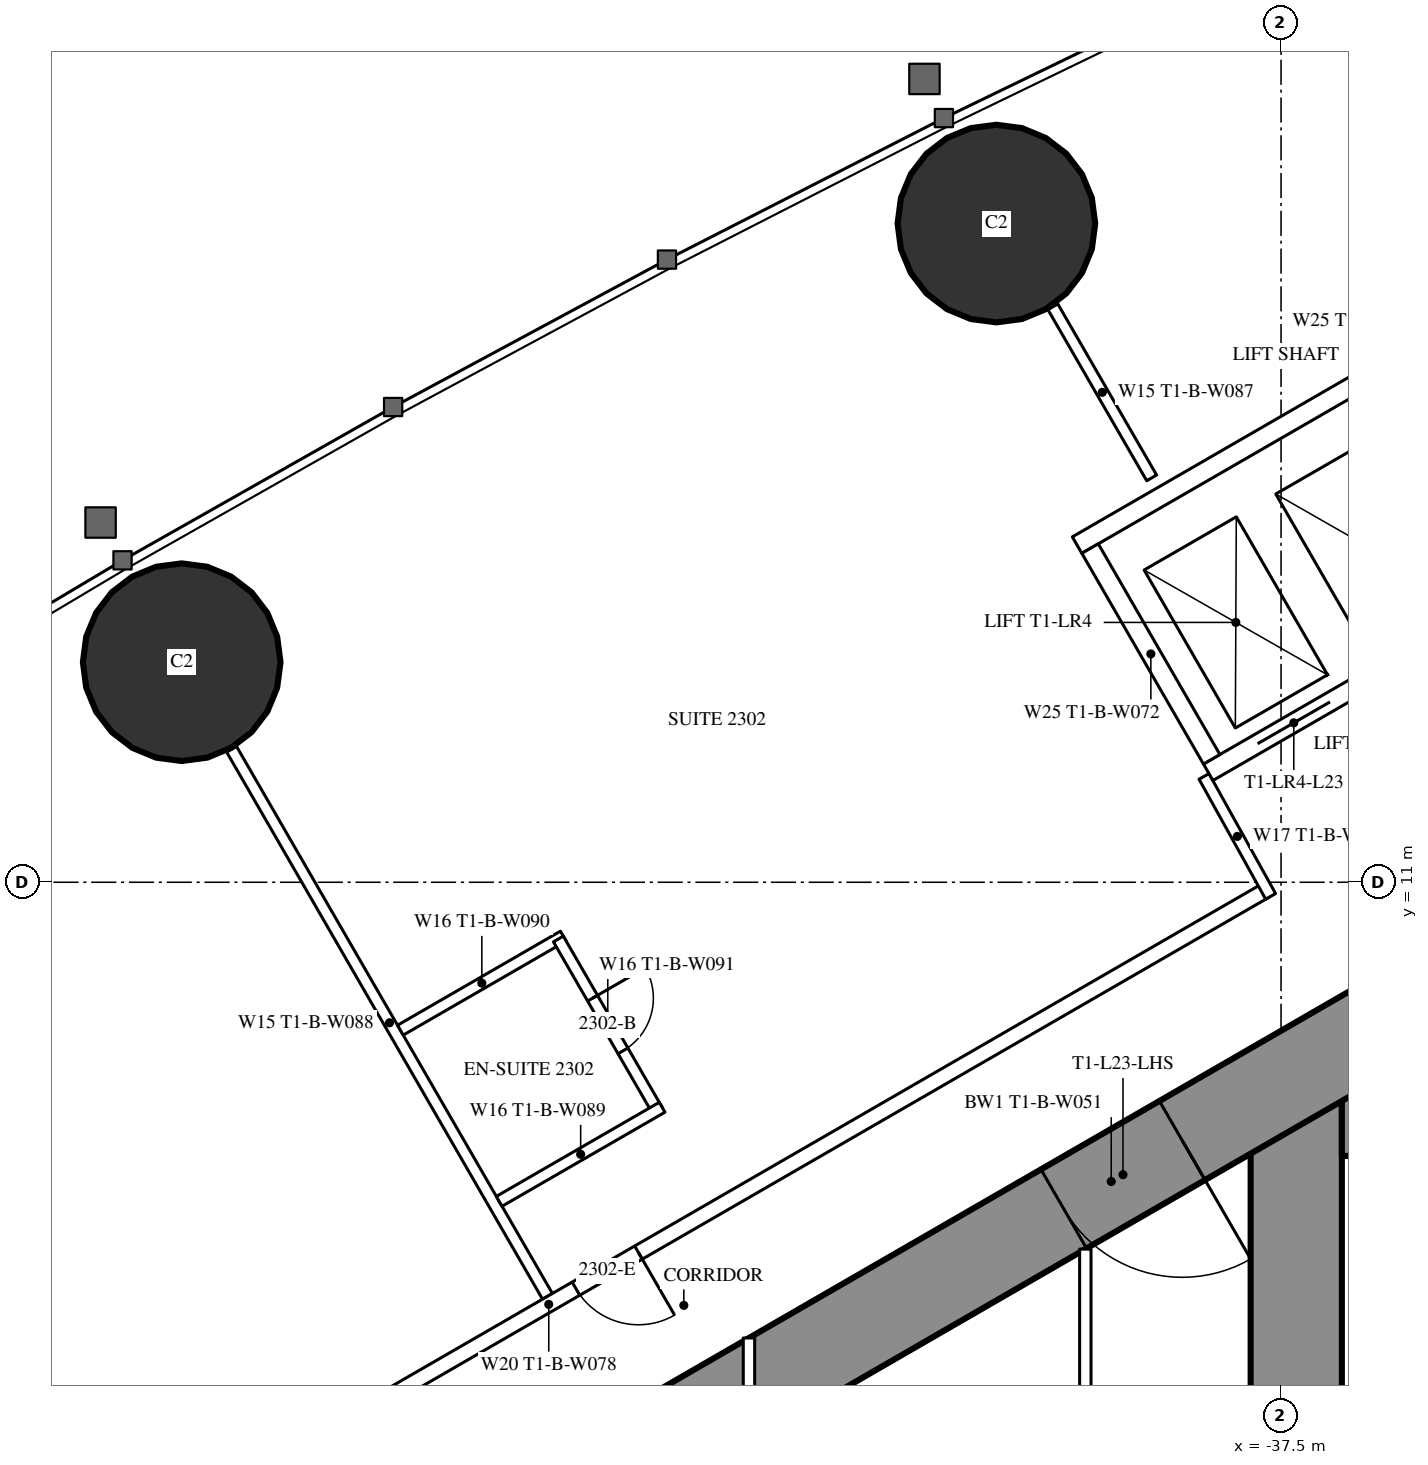
"""IFC4 building model, lengths in metres.
Left out: names, types, materials, properties, quantities, classifications, styles, units other than length and angle.
Written with IfcOpenShell. Run it as: python <this file> out.ifc"""

import sys

from ifc_helpers import new_model, si_unit, direction, frame, frame_2d, origin, origin_2d, place, context, subcontext, project, spatial, rectangle, hollow_circle, extrude, element, fill, save


model = new_model("IFC4")
c1 = context("Model", 3, precision=1e-05, world=origin(), true_north=direction((0.0, 1.0)))
c2 = subcontext(c1, "Body", "Model", "MODEL_VIEW")
j1 = project(units=[si_unit("LENGTHUNIT", "METRE"), si_unit("PLANEANGLEUNIT", "RADIAN")], contexts=[c1])
p1 = place(None, origin())
s1 = spatial("IfcSite", under=j1, at=p1, CompositionType="ELEMENT")
p2 = place(p1, origin())
s2 = spatial("IfcBuilding", under=s1, at=p2, CompositionType="ELEMENT")
p3 = place(p2, frame((0.0, 0.0, 90.6)))
s3 = spatial("IfcBuildingStorey", under=s2, at=p3, CompositionType="ELEMENT", Elevation=90.6)
for number, where, z_axis, x_axis in (
    (1, (-41.245, 19.666, 0.0), (0.0, 0.0, 1.0), (1.0, 0.0, 0.0)),
    (2, (-51.963, 13.895, 0.0), (0.0, 0.0, 1.0), (1.0, 0.0, 0.0)),
):
    element("IfcColumn", number, at=place(p3, frame(where, z_axis=z_axis, x_axis=x_axis)), inside=s3, PredefinedType="COLUMN", context=c2, shape_type="SweptSolid", body=[
        extrude(hollow_circle(Radius=1.3, WallThickness=0.1, at=origin_2d()), origin(), (0.0, 0.0, 1.0), 3.5),
    ])
p4 = place(p3, frame((-37.3, 8.6, 0.0), z_axis=(0.0, 0.0, 1.0), x_axis=(0.0, -1.0, 0.0)))
e3 = element("IfcWall", 3, at=p4, inside=s3, PredefinedType="SHEAR", context=c2, shape_type="SweptSolid", body=[
    extrude(rectangle(XDim=17.2, YDim=1.2, at=frame_2d((8.6, 0.0))), origin(), (0.0, 0.0, 1.0), 3.5),
])
p5 = place(p4, frame((7.7, 0.0, 0.0)))
e4 = element("IfcOpeningElement", 4, at=p5, cuts=e3, PredefinedType="OPENING", context=c2, shape_type="SweptSolid", body=[
    extrude(rectangle(XDim=1.8, YDim=2.2, at=frame_2d((0.9, 1.1))), frame((0.0, 0.61, 0.0), z_axis=(0.0, -1.0, 0.0), x_axis=(1.0, 0.0, 0.0)), (0.0, 0.0, 1.0), 1.22),
])
p6 = place(p3, frame((-28.3, 8.0, 0.0), z_axis=(0.0, 0.0, 1.0), x_axis=(-1.0, 0.0, 0.0)))
e5 = element("IfcWall", 5, at=p6, inside=s3, PredefinedType="SHEAR", context=c2, shape_type="SweptSolid", body=[
    extrude(rectangle(XDim=8.4, YDim=1.2, at=frame_2d((4.2, 0.0))), origin(), (0.0, 0.0, 1.0), 3.5),
])
p7 = place(p6, frame((0.25, 0.0, 0.0)))
e6 = element("IfcOpeningElement", 6, at=p7, cuts=e5, PredefinedType="OPENING", context=c2, shape_type="SweptSolid", body=[
    extrude(rectangle(XDim=1.0, YDim=2.2, at=frame_2d((0.5, 1.1))), frame((0.0, 0.61, 0.0), z_axis=(0.0, -1.0, 0.0), x_axis=(1.0, 0.0, 0.0)), (0.0, 0.0, 1.0), 1.22),
])
p8 = place(p3, frame((-27.2, 14.3, 0.0), z_axis=(0.0, 0.0, 1.0), x_axis=(-0.866026593062, -0.499997940104, 0.0)))
e7 = element("IfcWall", 7, at=p8, inside=s3, PredefinedType="SHEAR", context=c2, shape_type="SweptSolid", body=[
    extrude(rectangle(XDim=28.946, YDim=1.2, at=frame_2d((14.473, 0.0))), origin(), (0.0, 0.0, 1.0), 3.5),
])
p9 = place(p8, frame((4.6, 0.0, 0.0)))
e8 = element("IfcOpeningElement", 8, at=p9, cuts=e7, PredefinedType="OPENING", context=c2, shape_type="SweptSolid", body=[
    extrude(rectangle(XDim=1.0, YDim=2.2, at=frame_2d((0.5, 1.1))), frame((0.0, 0.61, 0.0), z_axis=(0.0, -1.0, 0.0), x_axis=(1.0, 0.0, 0.0)), (0.0, 0.0, 1.0), 1.22),
])
p10 = place(p8, frame((13.395, 0.0, 0.0)))
e9 = element("IfcOpeningElement", 9, at=p10, cuts=e7, PredefinedType="OPENING", context=c2, shape_type="SweptSolid", body=[
    extrude(rectangle(XDim=1.8, YDim=2.2, at=frame_2d((0.9, 1.1))), frame((0.0, 0.61, 0.0), z_axis=(0.0, -1.0, 0.0), x_axis=(1.0, 0.0, 0.0)), (0.0, 0.0, 1.0), 1.22),
])
p11 = place(p3, frame((-47.151, 5.552, 0.0), z_axis=(0.0, 0.0, 1.0), x_axis=(-0.500003012045, 0.866023664773, 0.0)))
e10 = element("IfcWall", 10, at=p11, inside=s3, PredefinedType="PARTITIONING", context=c2, shape_type="SweptSolid", body=[
    extrude(rectangle(XDim=8.311, YDim=0.15, at=frame_2d((4.156, 0.0))), origin(), (0.0, 0.0, 1.0), 2.2),
])
p12 = place(p3, frame((-39.202, 16.32, 0.0), z_axis=(0.0, 0.0, 1.0), x_axis=(-0.499947391036, 0.866055775454, 0.0)))
e11 = element("IfcWall", 11, at=p12, inside=s3, PredefinedType="PARTITIONING", context=c2, shape_type="SweptSolid", body=[
    extrude(rectangle(XDim=2.599, YDim=0.15, at=frame_2d((1.3, 0.0))), origin(), (0.0, 0.0, 1.0), 3.25),
])
p13 = place(p3, frame((-37.7, 10.894, 0.0), z_axis=(0.0, 0.0, 1.0), x_axis=(-0.866027905338, -0.499995667157, 0.0)))
e12 = element("IfcWall", 12, at=p13, inside=s3, PredefinedType="PARTITIONING", context=c2, shape_type="SweptSolid", body=[
    extrude(rectangle(XDim=21.787, YDim=0.2, at=frame_2d((10.894, 0.0))), origin(), (0.0, 0.0, 1.0), 3.25),
])
p14 = place(p13, frame((17.887, 0.0, 0.0)))
e13 = element("IfcOpeningElement", 13, at=p14, cuts=e12, PredefinedType="OPENING", context=c2, shape_type="SweptSolid", body=[
    extrude(rectangle(XDim=0.95, YDim=2.2, at=frame_2d((0.475, 1.1))), frame((0.0, 0.11, 0.0), z_axis=(0.0, -1.0, 0.0), x_axis=(1.0, 0.0, 0.0)), (0.0, 0.0, 1.0), 0.22),
])
p15 = place(p13, frame((9.531, 0.0, 0.0)))
e14 = element("IfcOpeningElement", 14, at=p15, cuts=e12, PredefinedType="OPENING", context=c2, shape_type="SweptSolid", body=[
    extrude(rectangle(XDim=0.95, YDim=2.2, at=frame_2d((0.475, 1.1))), frame((0.0, 0.11, 0.0), z_axis=(0.0, -1.0, 0.0), x_axis=(1.0, 0.0, 0.0)), (0.0, 0.0, 1.0), 0.22),
])
p16 = place(p3, frame((-38.513, 12.392, 0.0), z_axis=(0.0, 0.0, 1.0), x_axis=(0.485585508183, -0.874189175317, 0.0)))
e15 = element("IfcWall", 15, at=p16, inside=s3, PredefinedType="PARTITIONING", context=c2, shape_type="SweptSolid", body=[
    extrude(rectangle(XDim=1.805, YDim=0.15, at=frame_2d((0.902, 0.0))), origin(), (0.0, 0.0, 1.0), 3.25),
])
p17 = place(p3, frame((-46.943, 10.292, 0.0), z_axis=(0.0, 0.0, 1.0), x_axis=(-0.866006523861, -0.500032699561, 0.0)))
e16 = element("IfcWall", 16, at=p17, inside=s3, PredefinedType="PARTITIONING", context=c2, shape_type="SweptSolid", body=[
    extrude(rectangle(XDim=2.475, YDim=0.15, at=frame_2d((1.237, 0.0))), origin(), (0.0, 0.0, 1.0), 3.25),
])
p18 = place(p3, frame((-45.708, 8.002, 0.0), z_axis=(0.0, 0.0, 1.0), x_axis=(-0.500047596559, 0.865997922154, 0.0)))
e17 = element("IfcWall", 17, at=p18, inside=s3, PredefinedType="PARTITIONING", context=c2, shape_type="SweptSolid", body=[
    extrude(rectangle(XDim=2.6, YDim=0.15, at=frame_2d((1.3, 0.0))), origin(), (0.0, 0.0, 1.0), 3.25),
])
p19 = place(p18, frame((0.9, 0.0, 0.0)))
e18 = element("IfcOpeningElement", 18, at=p19, cuts=e17, PredefinedType="OPENING", context=c2, shape_type="SweptSolid", body=[
    extrude(rectangle(XDim=0.8, YDim=2.2, at=frame_2d((0.4, 1.1))), frame((0.0, 0.085, 0.0), z_axis=(0.0, -1.0, 0.0), x_axis=(1.0, 0.0, 0.0)), (0.0, 0.0, 1.0), 0.17),
])
p20 = place(p3, frame((-45.643, 8.04, 0.0), z_axis=(0.0, 0.0, 1.0), x_axis=(-0.866006523861, -0.500032699561, 0.0)))
e19 = element("IfcWall", 19, at=p20, inside=s3, PredefinedType="PARTITIONING", context=c2, shape_type="SweptSolid", body=[
    extrude(rectangle(XDim=2.475, YDim=0.15, at=frame_2d((1.237, 0.0))), origin(), (0.0, 0.0, 1.0), 3.25),
])
p21 = place(p3, frame((-40.075, 6.174, 0.0), z_axis=(0.0, 0.0, 1.0), x_axis=(0.0, -1.0, 0.0)))
e20 = element("IfcWall", 20, at=p21, inside=s3, PredefinedType="PARTITIONING", context=c2, shape_type="SweptSolid", body=[
    extrude(rectangle(XDim=7.374, YDim=0.15, at=frame_2d((3.687, 0.0))), origin(), (0.0, 0.0, 1.0), 3.25),
])
p22 = place(p21, frame((2.787, 0.0, 0.0)))
e21 = element("IfcOpeningElement", 21, at=p22, cuts=e20, PredefinedType="OPENING", context=c2, shape_type="SweptSolid", body=[
    extrude(rectangle(XDim=1.8, YDim=2.2, at=frame_2d((0.9, 1.1))), frame((0.0, 0.085, 0.0), z_axis=(0.0, -1.0, 0.0), x_axis=(1.0, 0.0, 0.0)), (0.0, 0.0, 1.0), 0.17),
])
p23 = place(p3, frame((-44.5, 5.005, 0.0), z_axis=(0.0, 0.0, 1.0), x_axis=(0.0, -1.0, 0.0)))
e22 = element("IfcWall", 22, at=p23, inside=s3, PredefinedType="PARTITIONING", context=c2, shape_type="SweptSolid", body=[
    extrude(rectangle(XDim=10.009, YDim=0.15, at=frame_2d((5.005, 0.0))), origin(), (0.0, 0.0, 1.0), 2.45),
])
p24 = place(p23, frame((2.002, 0.0, 0.0)))
e23 = element("IfcOpeningElement", 23, at=p24, cuts=e22, PredefinedType="OPENING", context=c2, shape_type="SweptSolid", body=[
    extrude(rectangle(XDim=1.0, YDim=2.2, at=frame_2d((0.5, 1.1))), frame((0.0, 0.085, 0.0), z_axis=(0.0, -1.0, 0.0), x_axis=(1.0, 0.0, 0.0)), (0.0, 0.0, 1.0), 0.17),
])
p25 = place(p23, frame((7.007, 0.0, 0.0)))
e24 = element("IfcOpeningElement", 24, at=p25, cuts=e22, PredefinedType="OPENING", context=c2, shape_type="SweptSolid", body=[
    extrude(rectangle(XDim=1.0, YDim=2.2, at=frame_2d((0.5, 1.1))), frame((0.0, 0.085, 0.0), z_axis=(0.0, -1.0, 0.0), x_axis=(1.0, 0.0, 0.0)), (0.0, 0.0, 1.0), 0.17),
])
p26 = place(p3, frame((-31.01, 16.747, 0.0), z_axis=(0.0, 0.0, 1.0), x_axis=(-0.866028165386, -0.499995216735, 0.0)))
e25 = element("IfcWall", 25, at=p26, inside=s3, PredefinedType="PARTITIONING", context=c2, shape_type="SweptSolid", body=[
    extrude(rectangle(XDim=8.6, YDim=0.25, at=frame_2d((4.3, 0.0))), origin(), (0.0, 0.0, 1.0), 3.25),
])
p27 = place(p26, frame((0.75, 0.0, 0.0)))
e26 = element("IfcOpeningElement", 26, at=p27, cuts=e25, PredefinedType="OPENING", context=c2, shape_type="SweptSolid", body=[
    extrude(rectangle(XDim=1.1, YDim=2.2, at=frame_2d((0.55, 1.1))), frame((0.0, 0.135, 0.0), z_axis=(0.0, -1.0, 0.0), x_axis=(1.0, 0.0, 0.0)), (0.0, 0.0, 1.0), 0.27),
])
p28 = place(p26, frame((2.75, 0.0, 0.0)))
e27 = element("IfcOpeningElement", 27, at=p28, cuts=e25, PredefinedType="OPENING", context=c2, shape_type="SweptSolid", body=[
    extrude(rectangle(XDim=1.1, YDim=2.2, at=frame_2d((0.55, 1.1))), frame((0.0, 0.135, 0.0), z_axis=(0.0, -1.0, 0.0), x_axis=(1.0, 0.0, 0.0)), (0.0, 0.0, 1.0), 0.27),
])
p29 = place(p26, frame((4.75, 0.0, 0.0)))
e28 = element("IfcOpeningElement", 28, at=p29, cuts=e25, PredefinedType="OPENING", context=c2, shape_type="SweptSolid", body=[
    extrude(rectangle(XDim=1.1, YDim=2.2, at=frame_2d((0.55, 1.1))), frame((0.0, 0.135, 0.0), z_axis=(0.0, -1.0, 0.0), x_axis=(1.0, 0.0, 0.0)), (0.0, 0.0, 1.0), 0.27),
])
p30 = place(p26, frame((6.75, 0.0, 0.0)))
e29 = element("IfcOpeningElement", 29, at=p30, cuts=e25, PredefinedType="OPENING", context=c2, shape_type="SweptSolid", body=[
    extrude(rectangle(XDim=1.1, YDim=2.2, at=frame_2d((0.55, 1.1))), frame((0.0, 0.135, 0.0), z_axis=(0.0, -1.0, 0.0), x_axis=(1.0, 0.0, 0.0)), (0.0, 0.0, 1.0), 0.27),
])
p31 = place(p3, frame((-32.736, 19.736, 0.0), z_axis=(0.0, 0.0, 1.0), x_axis=(-0.866028165386, -0.499995216735, 0.0)))
e30 = element("IfcWall", 30, at=p31, inside=s3, PredefinedType="PARTITIONING", context=c2, shape_type="SweptSolid", body=[
    extrude(rectangle(XDim=8.6, YDim=0.25, at=frame_2d((4.3, 0.0))), origin(), (0.0, 0.0, 1.0), 3.25),
])
p32 = place(p3, frame((-38.413, 12.618, 0.0), z_axis=(0.0, 0.0, 1.0), x_axis=(-0.499872130319, 0.866099216793, 0.0)))
e31 = element("IfcWall", 31, at=p32, inside=s3, PredefinedType="PARTITIONING", context=c2, shape_type="SweptSolid", body=[
    extrude(rectangle(XDim=3.2, YDim=0.25, at=frame_2d((1.6, 0.0))), origin(), (0.0, 0.0, 1.0), 3.25),
])
p33 = place(p19, origin())
e32 = element("IfcDoor", 32, at=p33, inside=s3, OperationType="SINGLE_SWING_RIGHT", PredefinedType="DOOR", context=c2, shape_type="SweptSolid", body=[
    extrude(rectangle(XDim=0.8, YDim=2.2, at=frame_2d((0.4, 1.1))), frame((0.0, 0.025, 0.0), z_axis=(0.0, -1.0, 0.0), x_axis=(1.0, 0.0, 0.0)), (0.0, 0.0, 1.0), 0.05),
])
fill(e18, e32)
p34 = place(p15, origin())
e33 = element("IfcDoor", 33, at=p34, inside=s3, OperationType="SINGLE_SWING_LEFT", PredefinedType="DOOR", context=c2, shape_type="SweptSolid", body=[
    extrude(rectangle(XDim=0.95, YDim=2.2, at=frame_2d((0.475, 1.1))), frame((0.0, 0.025, 0.0), z_axis=(0.0, -1.0, 0.0), x_axis=(1.0, 0.0, 0.0)), (0.0, 0.0, 1.0), 0.05),
])
fill(e14, e33)
p35 = place(p10, origin())
e34 = element("IfcDoor", 34, at=p35, inside=s3, OperationType="DOUBLE_DOOR_SINGLE_SWING", PredefinedType="DOOR", context=c2, shape_type="SweptSolid", body=[
    extrude(rectangle(XDim=1.8, YDim=2.2, at=frame_2d((0.9, 1.1))), frame((0.0, 0.025, 0.0), z_axis=(0.0, -1.0, 0.0), x_axis=(1.0, 0.0, 0.0)), (0.0, 0.0, 1.0), 0.05),
])
fill(e9, e34)
p36 = place(p30, origin())
e35 = element("IfcDoor", 35, at=p36, inside=s3, OperationType="DOUBLE_DOOR_SLIDING", PredefinedType="USERDEFINED", context=c2, shape_type="SweptSolid", body=[
    extrude(rectangle(XDim=1.1, YDim=2.2, at=frame_2d((0.55, 1.1))), frame((0.0, 0.025, 0.0), z_axis=(0.0, -1.0, 0.0), x_axis=(1.0, 0.0, 0.0)), (0.0, 0.0, 1.0), 0.05),
])
fill(e29, e35)
save(model, sys.argv[1])
